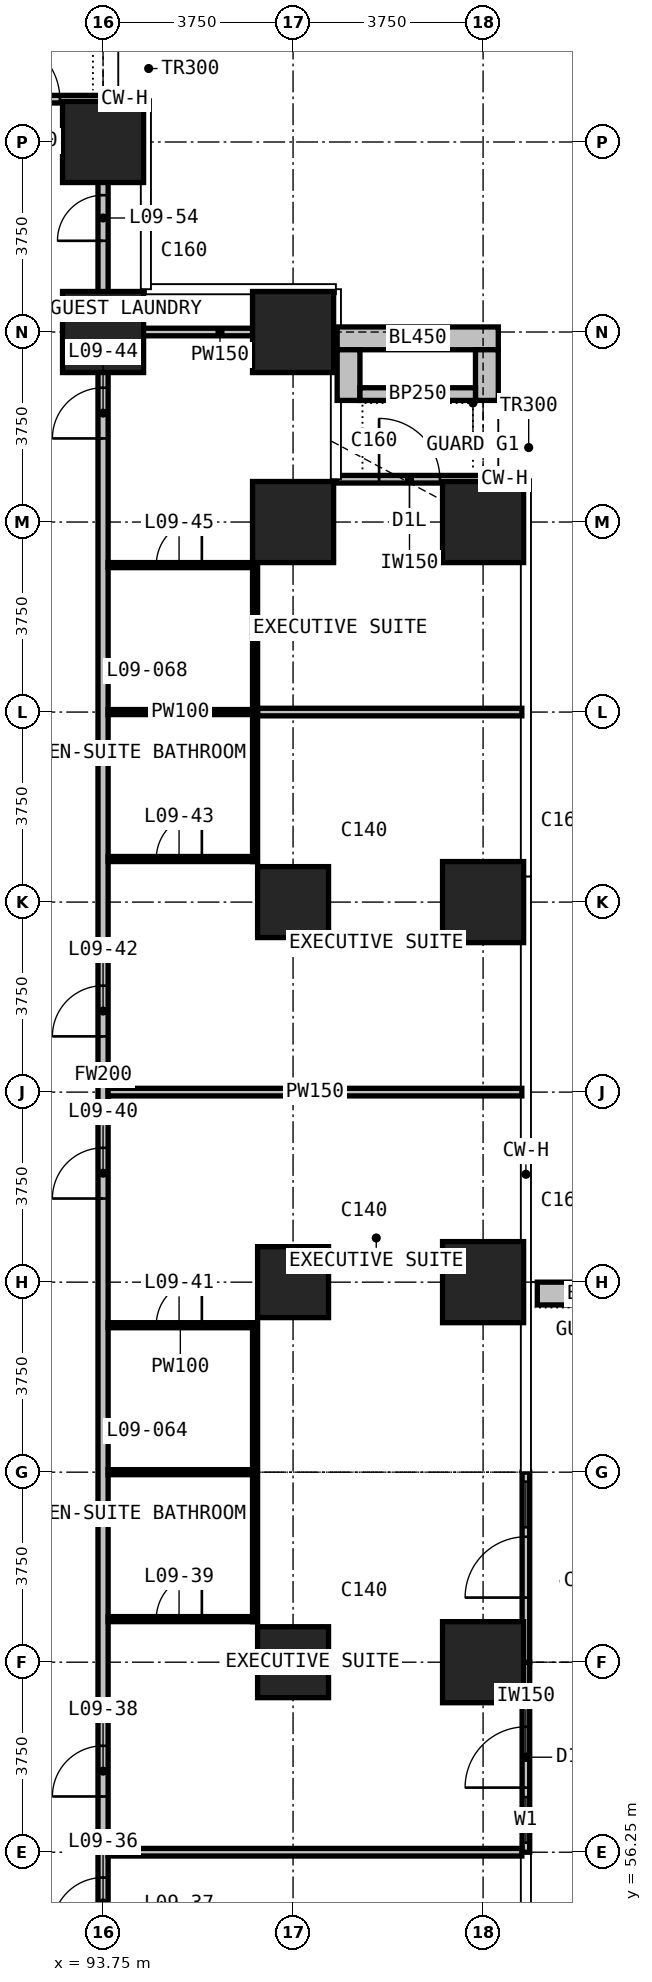
"""IFC4 building model, lengths in metres.
Left out: names, types, materials, properties, quantities, classifications, styles, units other than length and angle.
Written with IfcOpenShell. Run it as: python <this file> out.ifc"""

import sys

from ifc_helpers import new_model, si_unit, direction, frame, frame_2d, origin, origin_2d, place, context, subcontext, project, spatial, rectangle, extrude, element, fill, save


model = new_model("IFC4")
c1 = context("Model", 3, precision=1e-05, world=origin(), true_north=direction((0.0, 1.0)))
c2 = subcontext(c1, "Body", "Model", "MODEL_VIEW")
j1 = project(units=[si_unit("LENGTHUNIT", "METRE"), si_unit("PLANEANGLEUNIT", "RADIAN")], contexts=[c1])
p1 = place(None, origin())
s1 = spatial("IfcSite", under=j1, at=p1, CompositionType="ELEMENT")
p2 = place(p1, origin())
s2 = spatial("IfcBuilding", under=s1, at=p2, CompositionType="ELEMENT")
p3 = place(p2, frame((0.0, 0.0, 49.4)))
s3 = spatial("IfcBuildingStorey", under=s2, at=p3, CompositionType="ELEMENT", Elevation=49.4)
for number, where, z_axis, x_axis in (
    (1, (93.75, 86.25, 0.0), (0.0, 0.0, 1.0), (1.0, 0.0, 0.0)),
    (2, (93.75, 90.0, 0.0), (0.0, 0.0, 1.0), (1.0, 0.0, 0.0)),
):
    element("IfcColumn", number, at=place(p3, frame(where, z_axis=z_axis, x_axis=x_axis)), inside=s3, PredefinedType="COLUMN", context=c2, shape_type="SweptSolid", body=[
        extrude(rectangle(XDim=1.6, YDim=1.6, at=origin_2d()), origin(), (0.0, 0.0, 1.0), 3.3),
    ])
for number, where, z_axis, x_axis in (
    (3, (97.5, 60.0, 0.0), (0.0, 0.0, 1.0), (1.0, 0.0, 0.0)),
    (4, (97.5, 67.5, 0.0), (0.0, 0.0, 1.0), (1.0, 0.0, 0.0)),
    (5, (97.5, 75.0, 0.0), (0.0, 0.0, 1.0), (1.0, 0.0, 0.0)),
):
    element("IfcColumn", number, at=place(p3, frame(where, z_axis=z_axis, x_axis=x_axis)), inside=s3, PredefinedType="COLUMN", context=c2, shape_type="SweptSolid", body=[
        extrude(rectangle(XDim=1.4, YDim=1.4, at=origin_2d()), origin(), (0.0, 0.0, 1.0), 3.3),
    ])
for number, where, z_axis, x_axis in (
    (6, (97.5, 82.5, 0.0), (0.0, 0.0, 1.0), (1.0, 0.0, 0.0)),
    (7, (97.5, 86.25, 0.0), (0.0, 0.0, 1.0), (1.0, 0.0, 0.0)),
    (8, (101.25, 60.0, 0.0), (0.0, 0.0, 1.0), (1.0, 0.0, 0.0)),
    (9, (101.25, 67.5, 0.0), (0.0, 0.0, 1.0), (1.0, 0.0, 0.0)),
    (10, (101.25, 75.0, 0.0), (0.0, 0.0, 1.0), (1.0, 0.0, 0.0)),
    (11, (101.25, 82.5, 0.0), (0.0, 0.0, 1.0), (1.0, 0.0, 0.0)),
):
    element("IfcColumn", number, at=place(p3, frame(where, z_axis=z_axis, x_axis=x_axis)), inside=s3, PredefinedType="COLUMN", context=c2, shape_type="SweptSolid", body=[
        extrude(rectangle(XDim=1.6, YDim=1.6, at=origin_2d()), origin(), (0.0, 0.0, 1.0), 3.3),
    ])
p4 = place(p3, frame((102.095, 56.25, 0.0), z_axis=(0.0, 0.0, 1.0), x_axis=(0.0, 1.0, 0.0)))
e12 = element("IfcWall", 12, at=p4, inside=s3, PredefinedType="SOLIDWALL", context=c2, shape_type="SweptSolid", body=[
    extrude(rectangle(XDim=3.75, YDim=0.15, at=frame_2d((1.875, 0.0))), origin(), (0.0, 0.0, 1.0), 3.0),
])
p5 = place(p4, frame((0.188, 0.0, 0.1)))
e13 = element("IfcOpeningElement", 13, at=p5, cuts=e12, PredefinedType="OPENING", context=c2, shape_type="SweptSolid", body=[
    extrude(rectangle(XDim=0.9, YDim=2.4, at=frame_2d((0.45, 1.2))), frame((0.0, 0.085, 0.0), z_axis=(0.0, -1.0, 0.0), x_axis=(1.0, 0.0, 0.0)), (0.0, 0.0, 1.0), 0.17),
])
p6 = place(p4, frame((1.275, 0.0, 0.0)))
e14 = element("IfcOpeningElement", 14, at=p6, cuts=e12, PredefinedType="OPENING", context=c2, shape_type="SweptSolid", body=[
    extrude(rectangle(XDim=1.2, YDim=2.4, at=frame_2d((0.6, 1.2))), frame((0.0, 0.085, 0.0), z_axis=(0.0, -1.0, 0.0), x_axis=(1.0, 0.0, 0.0)), (0.0, 0.0, 1.0), 0.17),
])
p7 = place(p3, frame((102.095, 60.0, 0.0), z_axis=(0.0, 0.0, 1.0), x_axis=(0.0, 1.0, 0.0)))
e15 = element("IfcWall", 15, at=p7, inside=s3, PredefinedType="SOLIDWALL", context=c2, shape_type="SweptSolid", body=[
    extrude(rectangle(XDim=3.75, YDim=0.15, at=frame_2d((1.875, 0.0))), origin(), (0.0, 0.0, 1.0), 3.0),
])
p8 = place(p7, frame((1.275, 0.0, 0.0)))
e16 = element("IfcOpeningElement", 16, at=p8, cuts=e15, PredefinedType="OPENING", context=c2, shape_type="SweptSolid", body=[
    extrude(rectangle(XDim=1.2, YDim=2.4, at=frame_2d((0.6, 1.2))), frame((0.0, 0.085, 0.0), z_axis=(0.0, -1.0, 0.0), x_axis=(1.0, 0.0, 0.0)), (0.0, 0.0, 1.0), 0.17),
])
p9 = place(p7, frame((2.663, 0.0, 0.1)))
e17 = element("IfcOpeningElement", 17, at=p9, cuts=e15, PredefinedType="OPENING", context=c2, shape_type="SweptSolid", body=[
    extrude(rectangle(XDim=0.9, YDim=2.4, at=frame_2d((0.45, 1.2))), frame((0.0, 0.085, 0.0), z_axis=(0.0, -1.0, 0.0), x_axis=(1.0, 0.0, 0.0)), (0.0, 0.0, 1.0), 0.17),
])
p10 = place(p3, frame((98.345, 83.345, 0.0), z_axis=(0.0, 0.0, 1.0), x_axis=(1.0, 0.0, 0.0)))
e18 = element("IfcWall", 18, at=p10, inside=s3, PredefinedType="SOLIDWALL", context=c2, shape_type="SweptSolid", body=[
    extrude(rectangle(XDim=2.905, YDim=0.15, at=frame_2d((1.453, 0.0))), origin(), (0.0, 0.0, 1.0), 3.0),
])
p11 = place(p10, frame((0.853, 0.0, 0.0)))
e19 = element("IfcOpeningElement", 19, at=p11, cuts=e18, PredefinedType="OPENING", context=c2, shape_type="SweptSolid", body=[
    extrude(rectangle(XDim=1.2, YDim=2.0, at=frame_2d((0.6, 1.0))), frame((0.0, 0.085, 0.0), z_axis=(0.0, -1.0, 0.0), x_axis=(1.0, 0.0, 0.0)), (0.0, 0.0, 1.0), 0.17),
])
p12 = place(p3, frame((90.845, 90.845, 0.0), z_axis=(0.0, 0.0, 1.0), x_axis=(1.0, 0.0, 0.0)))
e20 = element("IfcWall", 20, at=p12, inside=s3, PredefinedType="SOLIDWALL", context=c2, shape_type="SweptSolid", body=[
    extrude(rectangle(XDim=2.905, YDim=0.15, at=frame_2d((1.453, 0.0))), origin(), (0.0, 0.0, 1.0), 3.0),
])
p13 = place(p12, frame((0.853, 0.0, 0.0)))
e21 = element("IfcOpeningElement", 21, at=p13, cuts=e20, PredefinedType="OPENING", context=c2, shape_type="SweptSolid", body=[
    extrude(rectangle(XDim=1.2, YDim=2.4, at=frame_2d((0.6, 1.2))), frame((0.0, 0.085, 0.0), z_axis=(0.0, -1.0, 0.0), x_axis=(1.0, 0.0, 0.0)), (0.0, 0.0, 1.0), 0.17),
])
p14 = place(p3, frame((102.32, 67.275, 0.0), z_axis=(0.0, 0.0, 1.0), x_axis=(1.0, 0.0, 0.0)))
e22 = element("IfcWall", 22, at=p14, inside=s3, PredefinedType="USERDEFINED", context=c2, shape_type="SweptSolid", body=[
    extrude(rectangle(XDim=2.33, YDim=0.45, at=frame_2d((1.165, 0.0))), origin(), (0.0, 0.0, 1.0), 1.1),
])
p15 = place(p3, frame((98.37, 86.125, 0.0), z_axis=(0.0, 0.0, 1.0), x_axis=(1.0, 0.0, 0.0)))
e23 = element("IfcWall", 23, at=p15, inside=s3, PredefinedType="USERDEFINED", context=c2, shape_type="SweptSolid", body=[
    extrude(rectangle(XDim=3.18, YDim=0.45, at=frame_2d((1.59, 0.0))), origin(), (0.0, 0.0, 1.0), 1.1),
])
for number, where, z_axis, x_axis in (
    (24, (98.595, 84.9, 0.0), (0.0, 0.0, 1.0), (0.0, 1.0, 0.0)),
    (25, (101.325, 84.9, 0.0), (0.0, 0.0, 1.0), (0.0, 1.0, 0.0)),
):
    element("IfcWall", number, at=place(p3, frame(where, z_axis=z_axis, x_axis=x_axis)), inside=s3, PredefinedType="USERDEFINED", context=c2, shape_type="SweptSolid", body=[
        extrude(rectangle(XDim=1.0, YDim=0.45, at=frame_2d((0.5, 0.0))), origin(), (0.0, 0.0, 1.0), 1.1),
    ])
p16 = place(p3, frame((98.82, 85.025, 0.0), z_axis=(0.0, 0.0, 1.0), x_axis=(1.0, 0.0, 0.0)))
e26 = element("IfcWall", 26, at=p16, inside=s3, PredefinedType="USERDEFINED", context=c2, shape_type="SweptSolid", body=[
    extrude(rectangle(XDim=2.28, YDim=0.25, at=frame_2d((1.14, 0.0))), origin(), (0.0, 0.0, 1.0), 1.0),
])
p17 = place(p3, frame((93.75, 52.4, 0.0), z_axis=(0.0, 0.0, 1.0), x_axis=(0.0, 1.0, 0.0)))
e27 = element("IfcWall", 27, at=p17, inside=s3, PredefinedType="PARTITIONING", context=c2, shape_type="SweptSolid", body=[
    extrude(rectangle(XDim=38.365, YDim=0.2, at=frame_2d((19.183, 0.0))), origin(), (0.0, 0.0, 1.0), 3.0),
])
p18 = place(p17, frame((2.35, 0.0, 0.0)))
e28 = element("IfcOpeningElement", 28, at=p18, cuts=e27, PredefinedType="OPENING", context=c2, shape_type="SweptSolid", body=[
    extrude(rectangle(XDim=1.0, YDim=2.2, at=frame_2d((0.5, 1.1))), frame((0.0, 0.11, 0.0), z_axis=(0.0, -1.0, 0.0), x_axis=(1.0, 0.0, 0.0)), (0.0, 0.0, 1.0), 0.22),
])
p19 = place(p17, frame((4.95, 0.0, 0.0)))
e29 = element("IfcOpeningElement", 29, at=p19, cuts=e27, PredefinedType="OPENING", context=c2, shape_type="SweptSolid", body=[
    extrude(rectangle(XDim=1.0, YDim=2.2, at=frame_2d((0.5, 1.1))), frame((0.0, 0.11, 0.0), z_axis=(0.0, -1.0, 0.0), x_axis=(1.0, 0.0, 0.0)), (0.0, 0.0, 1.0), 0.22),
])
p20 = place(p17, frame((16.75, 0.0, 0.0)))
e30 = element("IfcOpeningElement", 30, at=p20, cuts=e27, PredefinedType="OPENING", context=c2, shape_type="SweptSolid", body=[
    extrude(rectangle(XDim=1.0, YDim=2.2, at=frame_2d((0.5, 1.1))), frame((0.0, 0.11, 0.0), z_axis=(0.0, -1.0, 0.0), x_axis=(1.0, 0.0, 0.0)), (0.0, 0.0, 1.0), 0.22),
])
p21 = place(p17, frame((19.95, 0.0, 0.0)))
e31 = element("IfcOpeningElement", 31, at=p21, cuts=e27, PredefinedType="OPENING", context=c2, shape_type="SweptSolid", body=[
    extrude(rectangle(XDim=1.0, YDim=2.2, at=frame_2d((0.5, 1.1))), frame((0.0, 0.11, 0.0), z_axis=(0.0, -1.0, 0.0), x_axis=(1.0, 0.0, 0.0)), (0.0, 0.0, 1.0), 0.22),
])
p22 = place(p17, frame((31.75, 0.0, 0.0)))
e32 = element("IfcOpeningElement", 32, at=p22, cuts=e27, PredefinedType="OPENING", context=c2, shape_type="SweptSolid", body=[
    extrude(rectangle(XDim=1.0, YDim=2.2, at=frame_2d((0.5, 1.1))), frame((0.0, 0.11, 0.0), z_axis=(0.0, -1.0, 0.0), x_axis=(1.0, 0.0, 0.0)), (0.0, 0.0, 1.0), 0.22),
])
p23 = place(p17, frame((35.65, 0.0, 0.0)))
e33 = element("IfcOpeningElement", 33, at=p23, cuts=e27, PredefinedType="OPENING", context=c2, shape_type="SweptSolid", body=[
    extrude(rectangle(XDim=0.9, YDim=2.2, at=frame_2d((0.45, 1.1))), frame((0.0, 0.11, 0.0), z_axis=(0.0, -1.0, 0.0), x_axis=(1.0, 0.0, 0.0)), (0.0, 0.0, 1.0), 0.22),
])
for number, where, z_axis, x_axis in (
    (34, (93.85, 56.25, 0.0), (0.0, 0.0, 1.0), (1.0, 0.0, 0.0)),
    (35, (93.85, 71.25, 0.0), (0.0, 0.0, 1.0), (1.0, 0.0, 0.0)),
):
    element("IfcWall", number, at=place(p3, frame(where, z_axis=z_axis, x_axis=x_axis)), inside=s3, PredefinedType="PARTITIONING", context=c2, shape_type="SweptSolid", body=[
        extrude(rectangle(XDim=8.165, YDim=0.15, at=frame_2d((4.083, 0.0))), origin(), (0.0, 0.0, 1.0), 3.0),
    ])
p24 = place(p3, frame((96.8, 78.75, 0.0), z_axis=(0.0, 0.0, 1.0), x_axis=(1.0, 0.0, 0.0)))
e36 = element("IfcWall", 36, at=p24, inside=s3, PredefinedType="PARTITIONING", context=c2, shape_type="SweptSolid", body=[
    extrude(rectangle(XDim=5.215, YDim=0.15, at=frame_2d((2.607, 0.0))), origin(), (0.0, 0.0, 1.0), 3.0),
])
p25 = place(p3, frame((93.85, 86.25, 0.0), z_axis=(0.0, 0.0, 1.0), x_axis=(1.0, 0.0, 0.0)))
e37 = element("IfcWall", 37, at=p25, inside=s3, PredefinedType="PARTITIONING", context=c2, shape_type="SweptSolid", body=[
    extrude(rectangle(XDim=4.415, YDim=0.15, at=frame_2d((2.208, 0.0))), origin(), (0.0, 0.0, 1.0), 3.0),
])
p26 = place(p3, frame((93.85, 60.85, 0.0), z_axis=(0.0, 0.0, 1.0), x_axis=(1.0, 0.0, 0.0)))
e38 = element("IfcWall", 38, at=p26, inside=s3, PredefinedType="PARTITIONING", context=c2, shape_type="SweptSolid", body=[
    extrude(rectangle(XDim=2.85, YDim=0.1, at=frame_2d((1.425, 0.0))), origin(), (0.0, 0.0, 1.0), 3.0),
])
p27 = place(p26, frame((0.95, 0.0, 0.0)))
e39 = element("IfcOpeningElement", 39, at=p27, cuts=e38, PredefinedType="OPENING", context=c2, shape_type="SweptSolid", body=[
    extrude(rectangle(XDim=0.9, YDim=2.2, at=frame_2d((0.45, 1.1))), frame((0.0, 0.06, 0.0), z_axis=(0.0, -1.0, 0.0), x_axis=(1.0, 0.0, 0.0)), (0.0, 0.0, 1.0), 0.12),
])
p28 = place(p3, frame((93.85, 63.75, 0.0), z_axis=(0.0, 0.0, 1.0), x_axis=(1.0, 0.0, 0.0)))
e40 = element("IfcWall", 40, at=p28, inside=s3, PredefinedType="PARTITIONING", context=c2, shape_type="SweptSolid", body=[
    extrude(rectangle(XDim=2.85, YDim=0.1, at=frame_2d((1.425, 0.0))), origin(), (0.0, 0.0, 1.0), 3.0),
])
p29 = place(p3, frame((93.85, 66.65, 0.0), z_axis=(0.0, 0.0, 1.0), x_axis=(1.0, 0.0, 0.0)))
e41 = element("IfcWall", 41, at=p29, inside=s3, PredefinedType="PARTITIONING", context=c2, shape_type="SweptSolid", body=[
    extrude(rectangle(XDim=2.85, YDim=0.1, at=frame_2d((1.425, 0.0))), origin(), (0.0, 0.0, 1.0), 3.0),
])
p30 = place(p29, frame((0.95, 0.0, 0.0)))
e42 = element("IfcOpeningElement", 42, at=p30, cuts=e41, PredefinedType="OPENING", context=c2, shape_type="SweptSolid", body=[
    extrude(rectangle(XDim=0.9, YDim=2.2, at=frame_2d((0.45, 1.1))), frame((0.0, 0.06, 0.0), z_axis=(0.0, -1.0, 0.0), x_axis=(1.0, 0.0, 0.0)), (0.0, 0.0, 1.0), 0.12),
])
p31 = place(p3, frame((93.85, 75.85, 0.0), z_axis=(0.0, 0.0, 1.0), x_axis=(1.0, 0.0, 0.0)))
e43 = element("IfcWall", 43, at=p31, inside=s3, PredefinedType="PARTITIONING", context=c2, shape_type="SweptSolid", body=[
    extrude(rectangle(XDim=2.85, YDim=0.1, at=frame_2d((1.425, 0.0))), origin(), (0.0, 0.0, 1.0), 3.0),
])
p32 = place(p31, frame((0.95, 0.0, 0.0)))
e44 = element("IfcOpeningElement", 44, at=p32, cuts=e43, PredefinedType="OPENING", context=c2, shape_type="SweptSolid", body=[
    extrude(rectangle(XDim=0.9, YDim=2.2, at=frame_2d((0.45, 1.1))), frame((0.0, 0.06, 0.0), z_axis=(0.0, -1.0, 0.0), x_axis=(1.0, 0.0, 0.0)), (0.0, 0.0, 1.0), 0.12),
])
p33 = place(p3, frame((93.85, 78.75, 0.0), z_axis=(0.0, 0.0, 1.0), x_axis=(1.0, 0.0, 0.0)))
e45 = element("IfcWall", 45, at=p33, inside=s3, PredefinedType="PARTITIONING", context=c2, shape_type="SweptSolid", body=[
    extrude(rectangle(XDim=2.85, YDim=0.1, at=frame_2d((1.425, 0.0))), origin(), (0.0, 0.0, 1.0), 3.0),
])
p34 = place(p3, frame((93.85, 81.65, 0.0), z_axis=(0.0, 0.0, 1.0), x_axis=(1.0, 0.0, 0.0)))
e46 = element("IfcWall", 46, at=p34, inside=s3, PredefinedType="PARTITIONING", context=c2, shape_type="SweptSolid", body=[
    extrude(rectangle(XDim=2.85, YDim=0.1, at=frame_2d((1.425, 0.0))), origin(), (0.0, 0.0, 1.0), 3.0),
])
p35 = place(p34, frame((0.95, 0.0, 0.0)))
e47 = element("IfcOpeningElement", 47, at=p35, cuts=e46, PredefinedType="OPENING", context=c2, shape_type="SweptSolid", body=[
    extrude(rectangle(XDim=0.9, YDim=2.2, at=frame_2d((0.45, 1.1))), frame((0.0, 0.06, 0.0), z_axis=(0.0, -1.0, 0.0), x_axis=(1.0, 0.0, 0.0)), (0.0, 0.0, 1.0), 0.12),
])
for number, where, z_axis, x_axis in (
    (48, (96.75, 60.8, 0.0), (0.0, 0.0, 1.0), (0.0, 1.0, 0.0)),
    (49, (96.75, 75.8, 0.0), (0.0, 0.0, 1.0), (0.0, 1.0, 0.0)),
):
    element("IfcWall", number, at=place(p3, frame(where, z_axis=z_axis, x_axis=x_axis)), inside=s3, PredefinedType="PARTITIONING", context=c2, shape_type="SweptSolid", body=[
        extrude(rectangle(XDim=5.9, YDim=0.1, at=frame_2d((2.95, 0.0))), origin(), (0.0, 0.0, 1.0), 3.0),
    ])
p36 = place(p5, origin())
e50 = element("IfcWindow", 50, at=p36, inside=s3, PartitioningType="SINGLE_PANEL", PredefinedType="WINDOW", context=c2, shape_type="SweptSolid", body=[
    extrude(rectangle(XDim=0.9, YDim=2.4, at=frame_2d((0.45, 1.2))), frame((0.0, 0.03, 0.0), z_axis=(0.0, -1.0, 0.0), x_axis=(1.0, 0.0, 0.0)), (0.0, 0.0, 1.0), 0.06),
])
fill(e13, e50)
p37 = place(p6, origin())
e51 = element("IfcDoor", 51, at=p37, inside=s3, OperationType="SINGLE_SWING_LEFT", PredefinedType="DOOR", context=c2, shape_type="SweptSolid", body=[
    extrude(rectangle(XDim=1.2, YDim=2.4, at=frame_2d((0.6, 1.2))), frame((0.0, 0.025, 0.0), z_axis=(0.0, -1.0, 0.0), x_axis=(1.0, 0.0, 0.0)), (0.0, 0.0, 1.0), 0.05),
])
fill(e14, e51)
p38 = place(p8, origin())
e52 = element("IfcDoor", 52, at=p38, inside=s3, OperationType="SINGLE_SWING_LEFT", PredefinedType="DOOR", context=c2, shape_type="SweptSolid", body=[
    extrude(rectangle(XDim=1.2, YDim=2.4, at=frame_2d((0.6, 1.2))), frame((0.0, 0.025, 0.0), z_axis=(0.0, -1.0, 0.0), x_axis=(1.0, 0.0, 0.0)), (0.0, 0.0, 1.0), 0.05),
])
fill(e16, e52)
p39 = place(p9, origin())
e53 = element("IfcWindow", 53, at=p39, inside=s3, PartitioningType="SINGLE_PANEL", PredefinedType="WINDOW", context=c2, shape_type="SweptSolid", body=[
    extrude(rectangle(XDim=0.9, YDim=2.4, at=frame_2d((0.45, 1.2))), frame((0.0, 0.03, 0.0), z_axis=(0.0, -1.0, 0.0), x_axis=(1.0, 0.0, 0.0)), (0.0, 0.0, 1.0), 0.06),
])
fill(e17, e53)
p40 = place(p11, origin())
e54 = element("IfcDoor", 54, at=p40, inside=s3, OperationType="SINGLE_SWING_LEFT", PredefinedType="DOOR", context=c2, shape_type="SweptSolid", body=[
    extrude(rectangle(XDim=1.2, YDim=2.0, at=frame_2d((0.6, 1.0))), frame((0.0, 0.025, 0.0), z_axis=(0.0, -1.0, 0.0), x_axis=(1.0, 0.0, 0.0)), (0.0, 0.0, 1.0), 0.05),
])
fill(e19, e54)
p41 = place(p13, origin())
e55 = element("IfcDoor", 55, at=p41, inside=s3, OperationType="SINGLE_SWING_LEFT", PredefinedType="DOOR", context=c2, shape_type="SweptSolid", body=[
    extrude(rectangle(XDim=1.2, YDim=2.4, at=frame_2d((0.6, 1.2))), frame((0.0, 0.025, 0.0), z_axis=(0.0, -1.0, 0.0), x_axis=(1.0, 0.0, 0.0)), (0.0, 0.0, 1.0), 0.05),
])
fill(e21, e55)
p42 = place(p18, origin())
e56 = element("IfcDoor", 56, at=p42, inside=s3, OperationType="SINGLE_SWING_LEFT", PredefinedType="DOOR", context=c2, shape_type="SweptSolid", body=[
    extrude(rectangle(XDim=1.0, YDim=2.2, at=frame_2d((0.5, 1.1))), frame((0.0, 0.025, 0.0), z_axis=(0.0, -1.0, 0.0), x_axis=(1.0, 0.0, 0.0)), (0.0, 0.0, 1.0), 0.05),
])
fill(e28, e56)
p43 = place(p19, origin())
e57 = element("IfcDoor", 57, at=p43, inside=s3, OperationType="SINGLE_SWING_LEFT", PredefinedType="DOOR", context=c2, shape_type="SweptSolid", body=[
    extrude(rectangle(XDim=1.0, YDim=2.2, at=frame_2d((0.5, 1.1))), frame((0.0, 0.025, 0.0), z_axis=(0.0, -1.0, 0.0), x_axis=(1.0, 0.0, 0.0)), (0.0, 0.0, 1.0), 0.05),
])
fill(e29, e57)
p44 = place(p27, origin())
e58 = element("IfcDoor", 58, at=p44, inside=s3, OperationType="SINGLE_SWING_RIGHT", PredefinedType="DOOR", context=c2, shape_type="SweptSolid", body=[
    extrude(rectangle(XDim=0.9, YDim=2.2, at=frame_2d((0.45, 1.1))), frame((0.0, 0.025, 0.0), z_axis=(0.0, -1.0, 0.0), x_axis=(1.0, 0.0, 0.0)), (0.0, 0.0, 1.0), 0.05),
])
fill(e39, e58)
p45 = place(p20, origin())
e59 = element("IfcDoor", 59, at=p45, inside=s3, OperationType="SINGLE_SWING_RIGHT", PredefinedType="DOOR", context=c2, shape_type="SweptSolid", body=[
    extrude(rectangle(XDim=1.0, YDim=2.2, at=frame_2d((0.5, 1.1))), frame((0.0, 0.025, 0.0), z_axis=(0.0, -1.0, 0.0), x_axis=(1.0, 0.0, 0.0)), (0.0, 0.0, 1.0), 0.05),
])
fill(e30, e59)
p46 = place(p30, origin())
e60 = element("IfcDoor", 60, at=p46, inside=s3, OperationType="SINGLE_SWING_RIGHT", PredefinedType="DOOR", context=c2, shape_type="SweptSolid", body=[
    extrude(rectangle(XDim=0.9, YDim=2.2, at=frame_2d((0.45, 1.1))), frame((0.0, 0.025, 0.0), z_axis=(0.0, -1.0, 0.0), x_axis=(1.0, 0.0, 0.0)), (0.0, 0.0, 1.0), 0.05),
])
fill(e42, e60)
p47 = place(p21, origin())
e61 = element("IfcDoor", 61, at=p47, inside=s3, OperationType="SINGLE_SWING_RIGHT", PredefinedType="DOOR", context=c2, shape_type="SweptSolid", body=[
    extrude(rectangle(XDim=1.0, YDim=2.2, at=frame_2d((0.5, 1.1))), frame((0.0, 0.025, 0.0), z_axis=(0.0, -1.0, 0.0), x_axis=(1.0, 0.0, 0.0)), (0.0, 0.0, 1.0), 0.05),
])
fill(e31, e61)
p48 = place(p32, origin())
e62 = element("IfcDoor", 62, at=p48, inside=s3, OperationType="SINGLE_SWING_RIGHT", PredefinedType="DOOR", context=c2, shape_type="SweptSolid", body=[
    extrude(rectangle(XDim=0.9, YDim=2.2, at=frame_2d((0.45, 1.1))), frame((0.0, 0.025, 0.0), z_axis=(0.0, -1.0, 0.0), x_axis=(1.0, 0.0, 0.0)), (0.0, 0.0, 1.0), 0.05),
])
fill(e44, e62)
p49 = place(p22, origin())
e63 = element("IfcDoor", 63, at=p49, inside=s3, OperationType="SINGLE_SWING_RIGHT", PredefinedType="DOOR", context=c2, shape_type="SweptSolid", body=[
    extrude(rectangle(XDim=1.0, YDim=2.2, at=frame_2d((0.5, 1.1))), frame((0.0, 0.025, 0.0), z_axis=(0.0, -1.0, 0.0), x_axis=(1.0, 0.0, 0.0)), (0.0, 0.0, 1.0), 0.05),
])
fill(e32, e63)
p50 = place(p35, origin())
e64 = element("IfcDoor", 64, at=p50, inside=s3, OperationType="SINGLE_SWING_RIGHT", PredefinedType="DOOR", context=c2, shape_type="SweptSolid", body=[
    extrude(rectangle(XDim=0.9, YDim=2.2, at=frame_2d((0.45, 1.1))), frame((0.0, 0.025, 0.0), z_axis=(0.0, -1.0, 0.0), x_axis=(1.0, 0.0, 0.0)), (0.0, 0.0, 1.0), 0.05),
])
fill(e47, e64)
p51 = place(p23, origin())
e65 = element("IfcDoor", 65, at=p51, inside=s3, OperationType="SINGLE_SWING_RIGHT", PredefinedType="DOOR", context=c2, shape_type="SweptSolid", body=[
    extrude(rectangle(XDim=0.9, YDim=2.2, at=frame_2d((0.45, 1.1))), frame((0.0, 0.025, 0.0), z_axis=(0.0, -1.0, 0.0), x_axis=(1.0, 0.0, 0.0)), (0.0, 0.0, 1.0), 0.05),
])
fill(e33, e65)
save(model, sys.argv[1])
